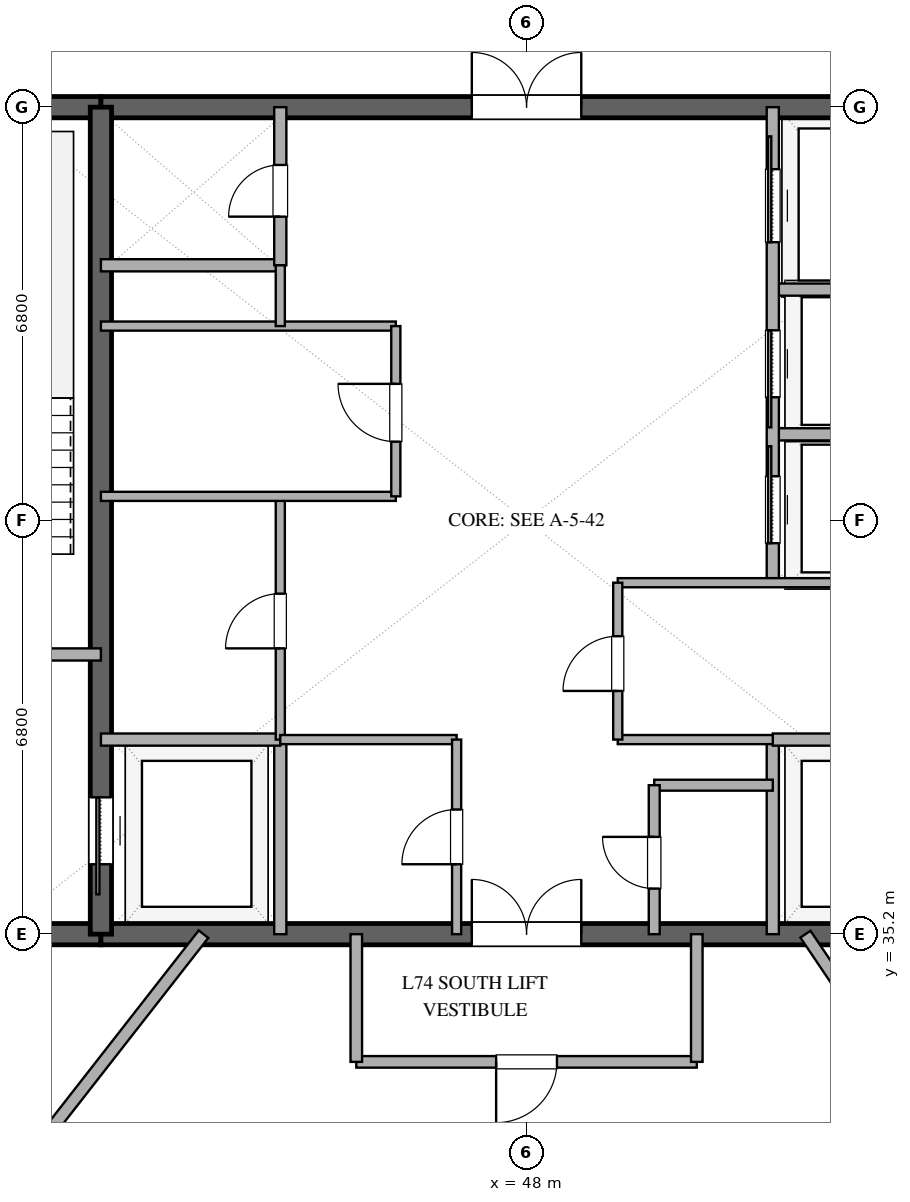
"""IFC4 building model, lengths in metres.
Left out: names, types, materials, properties, quantities, classifications, styles, units other than length and angle.
Written with IfcOpenShell. Run it as: python <this file> out.ifc"""

import sys

from ifc_helpers import new_model, si_unit, direction, frame, frame_2d, origin, place, context, subcontext, project, spatial, rectangle, extrude, element, fill, save


model = new_model("IFC4")
c1 = context("Model", 3, precision=1e-05, world=origin(), true_north=direction((0.0, 1.0)))
c2 = subcontext(c1, "Body", "Model", "MODEL_VIEW")
j1 = project(units=[si_unit("LENGTHUNIT", "METRE"), si_unit("PLANEANGLEUNIT", "RADIAN")], contexts=[c1])
p1 = place(None, origin())
s1 = spatial("IfcSite", under=j1, at=p1, CompositionType="ELEMENT")
p2 = place(p1, origin())
s2 = spatial("IfcBuilding", under=s1, at=p2, CompositionType="ELEMENT")
p3 = place(p2, frame((0.0, 0.0, 287.4)))
s3 = spatial("IfcBuildingStorey", under=s2, at=p3, CompositionType="ELEMENT", Elevation=287.4)
p4 = place(p3, frame((37.0, 35.2, 0.0), z_axis=(0.0, 0.0, 1.0), x_axis=(1.0, 0.0, 0.0)))
e1 = element("IfcWall", 1, at=p4, inside=s3, PredefinedType="SHEAR", context=c2, shape_type="SweptSolid", body=[
    extrude(rectangle(XDim=4.0, YDim=0.35, at=frame_2d((2.0, 0.0))), origin(), (0.0, 0.0, 1.0), 3.37),
])
p5 = place(p3, frame((41.0, 35.2, 0.0), z_axis=(0.0, 0.0, 1.0), x_axis=(1.0, 0.0, 0.0)))
e2 = element("IfcWall", 2, at=p5, inside=s3, PredefinedType="SHEAR", context=c2, shape_type="SweptSolid", body=[
    extrude(rectangle(XDim=14.0, YDim=0.35, at=frame_2d((7.0, 0.0))), origin(), (0.0, 0.0, 1.0), 3.37),
])
p6 = place(p5, frame((6.1, 0.0, 0.0)))
e3 = element("IfcOpeningElement", 3, at=p6, cuts=e2, PredefinedType="OPENING", context=c2, shape_type="SweptSolid", body=[
    extrude(rectangle(XDim=1.8, YDim=2.25, at=frame_2d((0.9, 1.125))), frame((0.0, 0.185, 0.0), z_axis=(0.0, -1.0, 0.0), x_axis=(1.0, 0.0, 0.0)), (0.0, 0.0, 1.0), 0.37),
])
p7 = place(p3, frame((37.0, 48.8, 0.0), z_axis=(0.0, 0.0, 1.0), x_axis=(1.0, 0.0, 0.0)))
e4 = element("IfcWall", 4, at=p7, inside=s3, PredefinedType="SHEAR", context=c2, shape_type="SweptSolid", body=[
    extrude(rectangle(XDim=4.0, YDim=0.35, at=frame_2d((2.0, 0.0))), origin(), (0.0, 0.0, 1.0), 3.37),
])
p8 = place(p3, frame((41.0, 48.8, 0.0), z_axis=(0.0, 0.0, 1.0), x_axis=(1.0, 0.0, 0.0)))
e5 = element("IfcWall", 5, at=p8, inside=s3, PredefinedType="SHEAR", context=c2, shape_type="SweptSolid", body=[
    extrude(rectangle(XDim=14.0, YDim=0.35, at=frame_2d((7.0, 0.0))), origin(), (0.0, 0.0, 1.0), 3.37),
])
p9 = place(p8, frame((6.1, 0.0, 0.0)))
e6 = element("IfcOpeningElement", 6, at=p9, cuts=e5, PredefinedType="OPENING", context=c2, shape_type="SweptSolid", body=[
    extrude(rectangle(XDim=1.8, YDim=2.25, at=frame_2d((0.9, 1.125))), frame((0.0, 0.185, 0.0), z_axis=(0.0, -1.0, 0.0), x_axis=(1.0, 0.0, 0.0)), (0.0, 0.0, 1.0), 0.37),
])
p10 = place(p3, frame((41.0, 35.2, 0.0), z_axis=(0.0, 0.0, 1.0), x_axis=(0.0, 1.0, 0.0)))
e7 = element("IfcWall", 7, at=p10, inside=s3, PredefinedType="SHEAR", context=c2, shape_type="SweptSolid", body=[
    extrude(rectangle(XDim=13.6, YDim=0.35, at=frame_2d((6.8, 0.0))), origin(), (0.0, 0.0, 1.0), 3.37),
])
p11 = place(p10, frame((1.15, 0.0, 0.0)))
e8 = element("IfcOpeningElement", 8, at=p11, cuts=e7, PredefinedType="OPENING", context=c2, shape_type="SweptSolid", body=[
    extrude(rectangle(XDim=1.1, YDim=2.2, at=frame_2d((0.55, 1.1))), frame((0.0, 0.185, 0.0), z_axis=(0.0, -1.0, 0.0), x_axis=(1.0, 0.0, 0.0)), (0.0, 0.0, 1.0), 0.37),
])
p12 = place(p3, frame((37.0, 39.8, 0.0), z_axis=(0.0, 0.0, 1.0), x_axis=(1.0, 0.0, 0.0)))
e9 = element("IfcWall", 9, at=p12, inside=s3, PredefinedType="SOLIDWALL", context=c2, shape_type="SweptSolid", body=[
    extrude(rectangle(XDim=4.0, YDim=0.2, at=frame_2d((2.0, 0.0))), origin(), (0.0, 0.0, 1.0), 2.73),
])
p13 = place(p12, frame((1.45, 0.0, 0.0)))
e10 = element("IfcOpeningElement", 10, at=p13, cuts=e9, PredefinedType="OPENING", context=c2, shape_type="SweptSolid", body=[
    extrude(rectangle(XDim=1.1, YDim=2.15, at=frame_2d((0.55, 1.075))), frame((0.0, 0.11, 0.0), z_axis=(0.0, -1.0, 0.0), x_axis=(1.0, 0.0, 0.0)), (0.0, 0.0, 1.0), 0.22),
])
p14 = place(p3, frame((43.95, 35.2, 0.0), z_axis=(0.0, 0.0, 1.0), x_axis=(0.0, 1.0, 0.0)))
e11 = element("IfcWall", 11, at=p14, inside=s3, PredefinedType="SOLIDWALL", context=c2, shape_type="SweptSolid", body=[
    extrude(rectangle(XDim=3.2, YDim=0.2, at=frame_2d((1.6, 0.0))), origin(), (0.0, 0.0, 1.0), 2.73),
])
p15 = place(p3, frame((41.0, 38.4, 0.0), z_axis=(0.0, 0.0, 1.0), x_axis=(1.0, 0.0, 0.0)))
e12 = element("IfcWall", 12, at=p15, inside=s3, PredefinedType="SOLIDWALL", context=c2, shape_type="SweptSolid", body=[
    extrude(rectangle(XDim=2.95, YDim=0.2, at=frame_2d((1.475, 0.0))), origin(), (0.0, 0.0, 1.0), 2.73),
])
p16 = place(p3, frame((52.05, 35.2, 0.0), z_axis=(0.0, 0.0, 1.0), x_axis=(0.0, 1.0, 0.0)))
e13 = element("IfcWall", 13, at=p16, inside=s3, PredefinedType="SOLIDWALL", context=c2, shape_type="SweptSolid", body=[
    extrude(rectangle(XDim=3.2, YDim=0.2, at=frame_2d((1.6, 0.0))), origin(), (0.0, 0.0, 1.0), 2.73),
])
for number, where, z_axis, x_axis in (
    (14, (52.05, 38.4, 0.0), (0.0, 0.0, 1.0), (1.0, 0.0, 0.0)),
    (15, (41.0, 46.2, 0.0), (0.0, 0.0, 1.0), (1.0, 0.0, 0.0)),
):
    element("IfcWall", number, at=place(p3, frame(where, z_axis=z_axis, x_axis=x_axis)), inside=s3, PredefinedType="SOLIDWALL", context=c2, shape_type="SweptSolid", body=[
        extrude(rectangle(XDim=2.95, YDim=0.2, at=frame_2d((1.475, 0.0))), origin(), (0.0, 0.0, 1.0), 2.73),
    ])
p17 = place(p3, frame((43.95, 46.2, 0.0), z_axis=(0.0, 0.0, 1.0), x_axis=(0.0, 1.0, 0.0)))
e16 = element("IfcWall", 16, at=p17, inside=s3, PredefinedType="SOLIDWALL", context=c2, shape_type="SweptSolid", body=[
    extrude(rectangle(XDim=2.6, YDim=0.2, at=frame_2d((1.3, 0.0))), origin(), (0.0, 0.0, 1.0), 2.73),
])
p18 = place(p17, frame((0.8, 0.0, 0.0)))
e17 = element("IfcOpeningElement", 17, at=p18, cuts=e16, PredefinedType="OPENING", context=c2, shape_type="SweptSolid", body=[
    extrude(rectangle(XDim=0.85, YDim=2.15, at=frame_2d((0.425, 1.075))), frame((0.0, 0.11, 0.0), z_axis=(0.0, -1.0, 0.0), x_axis=(1.0, 0.0, 0.0)), (0.0, 0.0, 1.0), 0.22),
])
p19 = place(p3, frame((43.95, 38.4, 0.0), z_axis=(0.0, 0.0, 1.0), x_axis=(0.0, 1.0, 0.0)))
e18 = element("IfcWall", 18, at=p19, inside=s3, PredefinedType="PARTITIONING", context=c2, shape_type="SweptSolid", body=[
    extrude(rectangle(XDim=4.0, YDim=0.15, at=frame_2d((2.0, 0.0))), origin(), (0.0, 0.0, 1.0), 2.73),
])
p20 = place(p19, frame((1.5, 0.0, 0.0)))
e19 = element("IfcOpeningElement", 19, at=p20, cuts=e18, PredefinedType="OPENING", context=c2, shape_type="SweptSolid", body=[
    extrude(rectangle(XDim=0.9, YDim=2.15, at=frame_2d((0.45, 1.075))), frame((0.0, 0.085, 0.0), z_axis=(0.0, -1.0, 0.0), x_axis=(1.0, 0.0, 0.0)), (0.0, 0.0, 1.0), 0.17),
])
for number, where, z_axis, x_axis in (
    (20, (41.0, 42.4, 0.0), (0.0, 0.0, 1.0), (1.0, 0.0, 0.0)),
    (21, (41.0, 45.2, 0.0), (0.0, 0.0, 1.0), (1.0, 0.0, 0.0)),
):
    element("IfcWall", number, at=place(p3, frame(where, z_axis=z_axis, x_axis=x_axis)), inside=s3, PredefinedType="PARTITIONING", context=c2, shape_type="SweptSolid", body=[
        extrude(rectangle(XDim=4.85, YDim=0.15, at=frame_2d((2.425, 0.0))), origin(), (0.0, 0.0, 1.0), 2.73),
    ])
p21 = place(p3, frame((43.95, 45.2, 0.0), z_axis=(0.0, 0.0, 1.0), x_axis=(0.0, 1.0, 0.0)))
e22 = element("IfcWall", 22, at=p21, inside=s3, PredefinedType="PARTITIONING", context=c2, shape_type="SweptSolid", body=[
    extrude(rectangle(XDim=1.0, YDim=0.15, at=frame_2d((0.5, 0.0))), origin(), (0.0, 0.0, 1.0), 2.73),
])
p22 = place(p3, frame((45.85, 42.4, 0.0), z_axis=(0.0, 0.0, 1.0), x_axis=(0.0, 1.0, 0.0)))
e23 = element("IfcWall", 23, at=p22, inside=s3, PredefinedType="PARTITIONING", context=c2, shape_type="SweptSolid", body=[
    extrude(rectangle(XDim=2.8, YDim=0.15, at=frame_2d((1.4, 0.0))), origin(), (0.0, 0.0, 1.0), 2.73),
])
p23 = place(p22, frame((0.9, 0.0, 0.0)))
e24 = element("IfcOpeningElement", 24, at=p23, cuts=e23, PredefinedType="OPENING", context=c2, shape_type="SweptSolid", body=[
    extrude(rectangle(XDim=0.95, YDim=2.15, at=frame_2d((0.475, 1.075))), frame((0.0, 0.085, 0.0), z_axis=(0.0, -1.0, 0.0), x_axis=(1.0, 0.0, 0.0)), (0.0, 0.0, 1.0), 0.17),
])
for number, where, z_axis, x_axis in (
    (25, (52.05, 43.42, 0.0), (0.0, 0.0, 1.0), (1.0, 0.0, 0.0)),
    (26, (52.05, 45.8, 0.0), (0.0, 0.0, 1.0), (1.0, 0.0, 0.0)),
):
    element("IfcWall", number, at=place(p3, frame(where, z_axis=z_axis, x_axis=x_axis)), inside=s3, PredefinedType="SOLIDWALL", context=c2, shape_type="SweptSolid", body=[
        extrude(rectangle(XDim=2.95, YDim=0.2, at=frame_2d((1.475, 0.0))), origin(), (0.0, 0.0, 1.0), 2.73),
    ])
p24 = place(p3, frame((52.05, 40.98, 0.0), z_axis=(0.0, 0.0, 1.0), x_axis=(0.0, 1.0, 0.0)))
e27 = element("IfcWall", 27, at=p24, inside=s3, PredefinedType="SOLIDWALL", context=c2, shape_type="SweptSolid", body=[
    extrude(rectangle(XDim=7.82, YDim=0.2, at=frame_2d((3.91, 0.0))), origin(), (0.0, 0.0, 1.0), 2.73),
])
p25 = place(p24, frame((0.65, 0.0, 0.0)))
e28 = element("IfcOpeningElement", 28, at=p25, cuts=e27, PredefinedType="OPENING", context=c2, shape_type="SweptSolid", body=[
    extrude(rectangle(XDim=1.1, YDim=2.2, at=frame_2d((0.55, 1.1))), frame((0.0, 0.11, 0.0), z_axis=(0.0, -1.0, 0.0), x_axis=(1.0, 0.0, 0.0)), (0.0, 0.0, 1.0), 0.22),
])
p26 = place(p24, frame((3.05, 0.0, 0.0)))
e29 = element("IfcOpeningElement", 29, at=p26, cuts=e27, PredefinedType="OPENING", context=c2, shape_type="SweptSolid", body=[
    extrude(rectangle(XDim=1.1, YDim=2.2, at=frame_2d((0.55, 1.1))), frame((0.0, 0.11, 0.0), z_axis=(0.0, -1.0, 0.0), x_axis=(1.0, 0.0, 0.0)), (0.0, 0.0, 1.0), 0.22),
])
p27 = place(p24, frame((5.6, 0.0, 0.0)))
e30 = element("IfcOpeningElement", 30, at=p27, cuts=e27, PredefinedType="OPENING", context=c2, shape_type="SweptSolid", body=[
    extrude(rectangle(XDim=1.2, YDim=2.2, at=frame_2d((0.6, 1.1))), frame((0.0, 0.11, 0.0), z_axis=(0.0, -1.0, 0.0), x_axis=(1.0, 0.0, 0.0)), (0.0, 0.0, 1.0), 0.22),
])
p28 = place(p3, frame((49.5, 40.98, 0.0), z_axis=(0.0, 0.0, 1.0), x_axis=(1.0, 0.0, 0.0)))
e31 = element("IfcWall", 31, at=p28, inside=s3, PredefinedType="PARTITIONING", context=c2, shape_type="SweptSolid", body=[
    extrude(rectangle(XDim=5.5, YDim=0.15, at=frame_2d((2.75, 0.0))), origin(), (0.0, 0.0, 1.0), 2.73),
])
p29 = place(p3, frame((49.5, 38.4, 0.0), z_axis=(0.0, 0.0, 1.0), x_axis=(1.0, 0.0, 0.0)))
e32 = element("IfcWall", 32, at=p29, inside=s3, PredefinedType="PARTITIONING", context=c2, shape_type="SweptSolid", body=[
    extrude(rectangle(XDim=2.55, YDim=0.15, at=frame_2d((1.275, 0.0))), origin(), (0.0, 0.0, 1.0), 2.73),
])
p30 = place(p3, frame((49.5, 38.4, 0.0), z_axis=(0.0, 0.0, 1.0), x_axis=(0.0, 1.0, 0.0)))
e33 = element("IfcWall", 33, at=p30, inside=s3, PredefinedType="PARTITIONING", context=c2, shape_type="SweptSolid", body=[
    extrude(rectangle(XDim=2.58, YDim=0.15, at=frame_2d((1.29, 0.0))), origin(), (0.0, 0.0, 1.0), 2.73),
])
p31 = place(p30, frame((0.8, 0.0, 0.0)))
e34 = element("IfcOpeningElement", 34, at=p31, cuts=e33, PredefinedType="OPENING", context=c2, shape_type="SweptSolid", body=[
    extrude(rectangle(XDim=0.9, YDim=2.15, at=frame_2d((0.45, 1.075))), frame((0.0, 0.085, 0.0), z_axis=(0.0, -1.0, 0.0), x_axis=(1.0, 0.0, 0.0)), (0.0, 0.0, 1.0), 0.17),
])
p32 = place(p3, frame((43.95, 38.4, 0.0), z_axis=(0.0, 0.0, 1.0), x_axis=(1.0, 0.0, 0.0)))
e35 = element("IfcWall", 35, at=p32, inside=s3, PredefinedType="PARTITIONING", context=c2, shape_type="SweptSolid", body=[
    extrude(rectangle(XDim=2.9, YDim=0.15, at=frame_2d((1.45, 0.0))), origin(), (0.0, 0.0, 1.0), 2.73),
])
p33 = place(p3, frame((46.85, 35.2, 0.0), z_axis=(0.0, 0.0, 1.0), x_axis=(0.0, 1.0, 0.0)))
e36 = element("IfcWall", 36, at=p33, inside=s3, PredefinedType="PARTITIONING", context=c2, shape_type="SweptSolid", body=[
    extrude(rectangle(XDim=3.2, YDim=0.15, at=frame_2d((1.6, 0.0))), origin(), (0.0, 0.0, 1.0), 2.73),
])
p34 = place(p33, frame((1.15, 0.0, 0.0)))
e37 = element("IfcOpeningElement", 37, at=p34, cuts=e36, PredefinedType="OPENING", context=c2, shape_type="SweptSolid", body=[
    extrude(rectangle(XDim=0.9, YDim=2.15, at=frame_2d((0.45, 1.075))), frame((0.0, 0.085, 0.0), z_axis=(0.0, -1.0, 0.0), x_axis=(1.0, 0.0, 0.0)), (0.0, 0.0, 1.0), 0.17),
])
p35 = place(p3, frame((50.1, 37.65, 0.0), z_axis=(0.0, 0.0, 1.0), x_axis=(1.0, 0.0, 0.0)))
e38 = element("IfcWall", 38, at=p35, inside=s3, PredefinedType="PLUMBINGWALL", context=c2, shape_type="SweptSolid", body=[
    extrude(rectangle(XDim=1.95, YDim=0.18, at=frame_2d((0.975, 0.0))), origin(), (0.0, 0.0, 1.0), 2.73),
])
p36 = place(p3, frame((50.1, 35.2, 0.0), z_axis=(0.0, 0.0, 1.0), x_axis=(0.0, 1.0, 0.0)))
e39 = element("IfcWall", 39, at=p36, inside=s3, PredefinedType="PLUMBINGWALL", context=c2, shape_type="SweptSolid", body=[
    extrude(rectangle(XDim=2.45, YDim=0.18, at=frame_2d((1.225, 0.0))), origin(), (0.0, 0.0, 1.0), 2.73),
])
p37 = place(p36, frame((0.75, 0.0, 0.0)))
e40 = element("IfcOpeningElement", 40, at=p37, cuts=e39, PredefinedType="OPENING", context=c2, shape_type="SweptSolid", body=[
    extrude(rectangle(XDim=0.85, YDim=2.1, at=frame_2d((0.425, 1.05))), frame((0.0, 0.1, 0.0), z_axis=(0.0, -1.0, 0.0), x_axis=(1.0, 0.0, 0.0)), (0.0, 0.0, 1.0), 0.2),
])
p38 = place(p3, frame((42.687, 35.2, 0.0), z_axis=(0.0, 0.0, 1.0), x_axis=(-0.615663811723, -0.788008928208, 0.0)))
e41 = element("IfcWall", 41, at=p38, inside=s3, PredefinedType="PARTITIONING", context=c2, shape_type="SweptSolid", body=[
    extrude(rectangle(XDim=12.701, YDim=0.2, at=frame_2d((6.351, 0.0))), origin(), (0.0, 0.0, 1.0), 2.73),
])
p39 = place(p3, frame((50.8, 33.1, 0.0), z_axis=(0.0, 0.0, 1.0), x_axis=(-1.0, 0.0, 0.0)))
e42 = element("IfcWall", 42, at=p39, inside=s3, PredefinedType="PARTITIONING", context=c2, shape_type="SweptSolid", body=[
    extrude(rectangle(XDim=5.6, YDim=0.19, at=frame_2d((2.8, 0.0))), origin(), (0.0, 0.0, 1.0), 2.73),
])
p40 = place(p39, frame((2.3, 0.0, 0.0)))
e43 = element("IfcOpeningElement", 43, at=p40, cuts=e42, PredefinedType="OPENING", context=c2, shape_type="SweptSolid", body=[
    extrude(rectangle(XDim=1.0, YDim=2.2, at=frame_2d((0.5, 1.1))), frame((0.0, 0.105, 0.0), z_axis=(0.0, -1.0, 0.0), x_axis=(1.0, 0.0, 0.0)), (0.0, 0.0, 1.0), 0.21),
])
p41 = place(p3, frame((54.97, 31.667, 0.0), z_axis=(0.0, 0.0, 1.0), x_axis=(-0.559200276542, 0.829032599308, 0.0)))
e44 = element("IfcWall", 44, at=p41, inside=s3, PredefinedType="PARTITIONING", context=c2, shape_type="SweptSolid", body=[
    extrude(rectangle(XDim=4.261, YDim=0.2, at=frame_2d((2.131, 0.0))), origin(), (0.0, 0.0, 1.0), 2.73),
])
for number, where, z_axis, x_axis in (
    (45, (50.8, 35.2, 0.0), (0.0, 0.0, 1.0), (0.0, -1.0, 0.0)),
    (46, (45.2, 33.1, 0.0), (0.0, 0.0, 1.0), (0.0, 1.0, 0.0)),
):
    element("IfcWall", number, at=place(p3, frame(where, z_axis=z_axis, x_axis=x_axis)), inside=s3, PredefinedType="PARTITIONING", context=c2, shape_type="SweptSolid", body=[
        extrude(rectangle(XDim=2.1, YDim=0.19, at=frame_2d((1.05, 0.0))), origin(), (0.0, 0.0, 1.0), 2.73),
    ])
p42 = place(p11, origin())
e47 = element("IfcDoor", 47, at=p42, inside=s3, OperationType="SLIDING_TO_LEFT", PredefinedType="DOOR", context=c2, shape_type="SweptSolid", body=[
    extrude(rectangle(XDim=1.1, YDim=2.2, at=frame_2d((0.55, 1.1))), frame((0.0, 0.025, 0.0), z_axis=(0.0, -1.0, 0.0), x_axis=(1.0, 0.0, 0.0)), (0.0, 0.0, 1.0), 0.05),
])
fill(e8, e47)
p43 = place(p6, origin())
e48 = element("IfcDoor", 48, at=p43, inside=s3, OperationType="DOUBLE_DOOR_SINGLE_SWING", PredefinedType="DOOR", context=c2, shape_type="SweptSolid", body=[
    extrude(rectangle(XDim=1.8, YDim=2.25, at=frame_2d((0.9, 1.125))), frame((0.0, 0.025, 0.0), z_axis=(0.0, -1.0, 0.0), x_axis=(1.0, 0.0, 0.0)), (0.0, 0.0, 1.0), 0.05),
])
fill(e3, e48)
p44 = place(p9, origin())
e49 = element("IfcDoor", 49, at=p44, inside=s3, OperationType="DOUBLE_DOOR_SINGLE_SWING", PredefinedType="DOOR", context=c2, shape_type="SweptSolid", body=[
    extrude(rectangle(XDim=1.8, YDim=2.25, at=frame_2d((0.9, 1.125))), frame((0.0, 0.025, 0.0), z_axis=(0.0, -1.0, 0.0), x_axis=(1.0, 0.0, 0.0)), (0.0, 0.0, 1.0), 0.05),
])
fill(e6, e49)
p45 = place(p18, origin())
e50 = element("IfcDoor", 50, at=p45, inside=s3, OperationType="SINGLE_SWING_LEFT", PredefinedType="DOOR", context=c2, shape_type="SweptSolid", body=[
    extrude(rectangle(XDim=0.85, YDim=2.15, at=frame_2d((0.425, 1.075))), frame((0.0, 0.025, 0.0), z_axis=(0.0, -1.0, 0.0), x_axis=(1.0, 0.0, 0.0)), (0.0, 0.0, 1.0), 0.05),
])
fill(e17, e50)
p46 = place(p20, origin())
e51 = element("IfcDoor", 51, at=p46, inside=s3, OperationType="SINGLE_SWING_LEFT", PredefinedType="DOOR", context=c2, shape_type="SweptSolid", body=[
    extrude(rectangle(XDim=0.9, YDim=2.15, at=frame_2d((0.45, 1.075))), frame((0.0, 0.025, 0.0), z_axis=(0.0, -1.0, 0.0), x_axis=(1.0, 0.0, 0.0)), (0.0, 0.0, 1.0), 0.05),
])
fill(e19, e51)
p47 = place(p23, origin())
e52 = element("IfcDoor", 52, at=p47, inside=s3, OperationType="SINGLE_SWING_RIGHT", PredefinedType="DOOR", context=c2, shape_type="SweptSolid", body=[
    extrude(rectangle(XDim=0.95, YDim=2.15, at=frame_2d((0.475, 1.075))), frame((0.0, 0.025, 0.0), z_axis=(0.0, -1.0, 0.0), x_axis=(1.0, 0.0, 0.0)), (0.0, 0.0, 1.0), 0.05),
])
fill(e24, e52)
p48 = place(p25, origin())
e53 = element("IfcDoor", 53, at=p48, inside=s3, OperationType="SLIDING_TO_RIGHT", PredefinedType="DOOR", context=c2, shape_type="SweptSolid", body=[
    extrude(rectangle(XDim=1.1, YDim=2.2, at=frame_2d((0.55, 1.1))), frame((0.0, 0.025, 0.0), z_axis=(0.0, -1.0, 0.0), x_axis=(1.0, 0.0, 0.0)), (0.0, 0.0, 1.0), 0.05),
])
fill(e28, e53)
p49 = place(p26, origin())
e54 = element("IfcDoor", 54, at=p49, inside=s3, OperationType="SLIDING_TO_LEFT", PredefinedType="DOOR", context=c2, shape_type="SweptSolid", body=[
    extrude(rectangle(XDim=1.1, YDim=2.2, at=frame_2d((0.55, 1.1))), frame((0.0, 0.025, 0.0), z_axis=(0.0, -1.0, 0.0), x_axis=(1.0, 0.0, 0.0)), (0.0, 0.0, 1.0), 0.05),
])
fill(e29, e54)
p50 = place(p27, origin())
e55 = element("IfcDoor", 55, at=p50, inside=s3, OperationType="SLIDING_TO_RIGHT", PredefinedType="DOOR", context=c2, shape_type="SweptSolid", body=[
    extrude(rectangle(XDim=1.2, YDim=2.2, at=frame_2d((0.6, 1.1))), frame((0.0, 0.025, 0.0), z_axis=(0.0, -1.0, 0.0), x_axis=(1.0, 0.0, 0.0)), (0.0, 0.0, 1.0), 0.05),
])
fill(e30, e55)
p51 = place(p31, origin())
e56 = element("IfcDoor", 56, at=p51, inside=s3, OperationType="SINGLE_SWING_LEFT", PredefinedType="DOOR", context=c2, shape_type="SweptSolid", body=[
    extrude(rectangle(XDim=0.9, YDim=2.15, at=frame_2d((0.45, 1.075))), frame((0.0, 0.025, 0.0), z_axis=(0.0, -1.0, 0.0), x_axis=(1.0, 0.0, 0.0)), (0.0, 0.0, 1.0), 0.05),
])
fill(e34, e56)
p52 = place(p34, origin())
e57 = element("IfcDoor", 57, at=p52, inside=s3, OperationType="SINGLE_SWING_LEFT", PredefinedType="DOOR", context=c2, shape_type="SweptSolid", body=[
    extrude(rectangle(XDim=0.9, YDim=2.15, at=frame_2d((0.45, 1.075))), frame((0.0, 0.025, 0.0), z_axis=(0.0, -1.0, 0.0), x_axis=(1.0, 0.0, 0.0)), (0.0, 0.0, 1.0), 0.05),
])
fill(e37, e57)
p53 = place(p37, origin())
e58 = element("IfcDoor", 58, at=p53, inside=s3, OperationType="SINGLE_SWING_RIGHT", PredefinedType="DOOR", context=c2, shape_type="SweptSolid", body=[
    extrude(rectangle(XDim=0.85, YDim=2.1, at=frame_2d((0.425, 1.05))), frame((0.0, 0.025, 0.0), z_axis=(0.0, -1.0, 0.0), x_axis=(1.0, 0.0, 0.0)), (0.0, 0.0, 1.0), 0.05),
])
fill(e40, e58)
p54 = place(p40, origin())
e59 = element("IfcDoor", 59, at=p54, inside=s3, OperationType="SINGLE_SWING_RIGHT", PredefinedType="DOOR", context=c2, shape_type="SweptSolid", body=[
    extrude(rectangle(XDim=1.0, YDim=2.2, at=frame_2d((0.5, 1.1))), frame((0.0, 0.025, 0.0), z_axis=(0.0, -1.0, 0.0), x_axis=(1.0, 0.0, 0.0)), (0.0, 0.0, 1.0), 0.05),
])
fill(e43, e59)
save(model, sys.argv[1])
